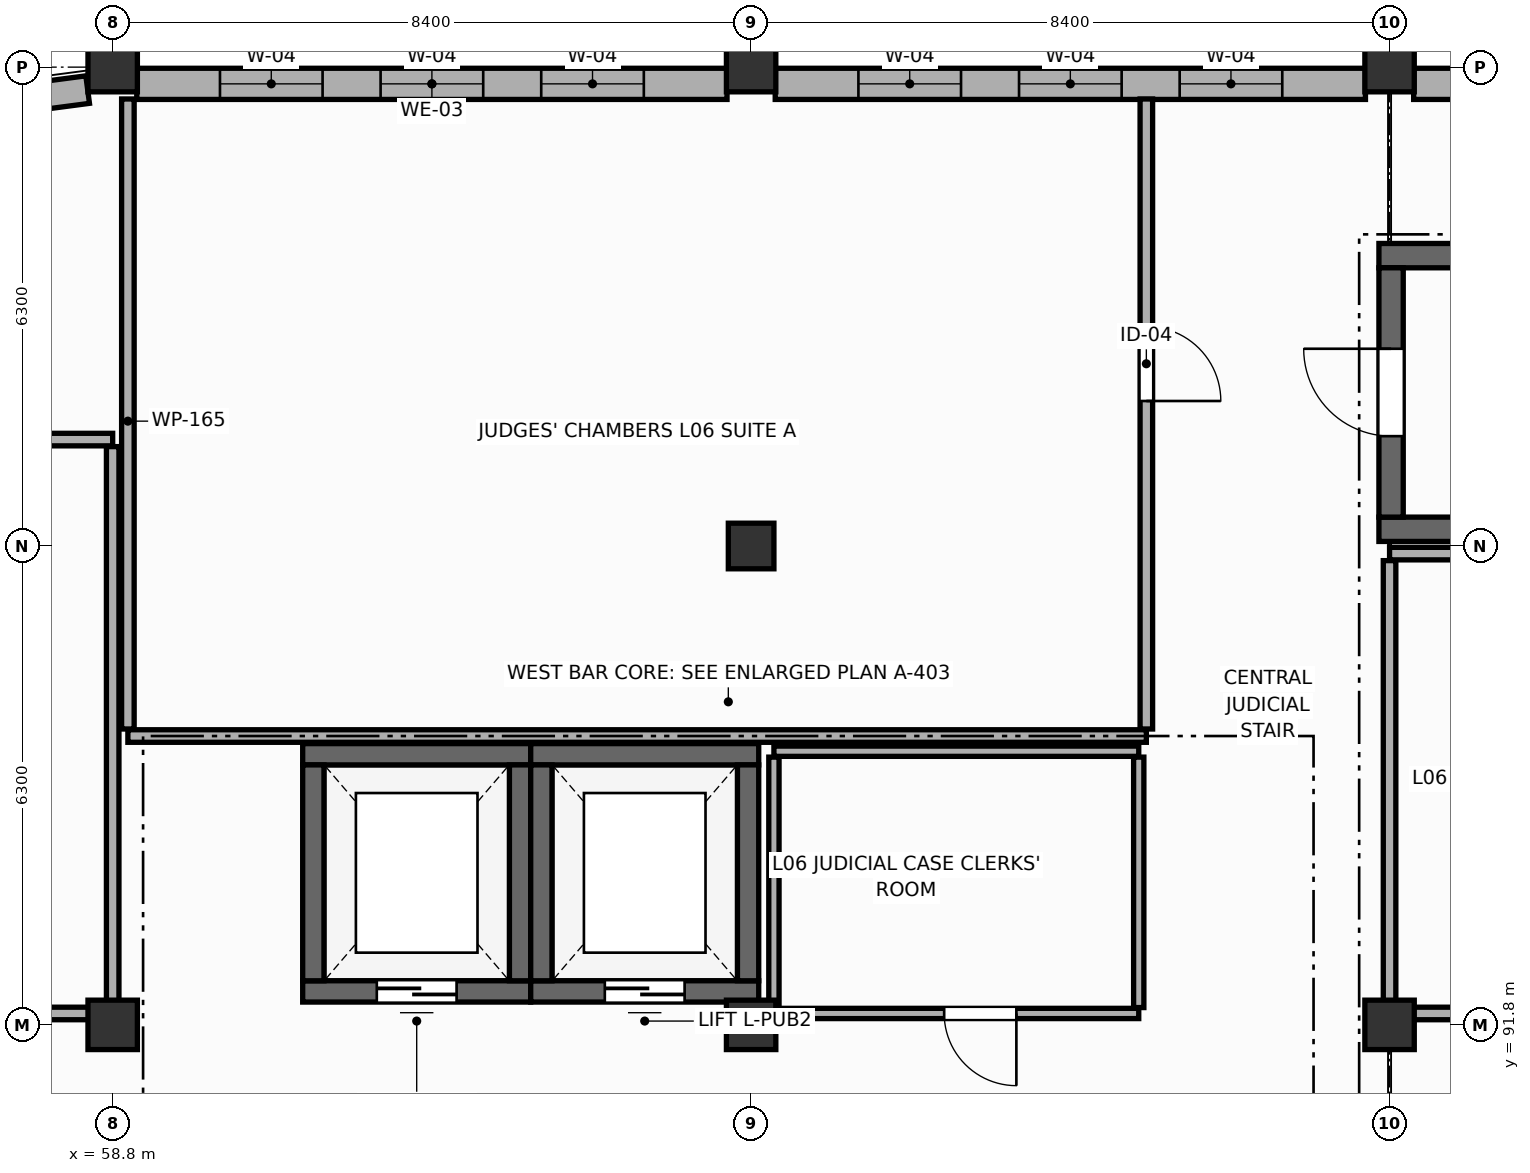
"""IFC4 building model, lengths in metres.
Left out: names, types, materials, properties, quantities, classifications, styles, units other than length and angle.
Written with IfcOpenShell. Run it as: python <this file> out.ifc"""

import sys

from ifc_helpers import new_model, si_unit, direction, frame, frame_2d, origin, origin_2d, place, context, subcontext, project, spatial, rectangle, extrude, element, fill, save


model = new_model("IFC4")
c1 = context("Model", 3, precision=1e-05, world=origin(), true_north=direction((0.0, 1.0)))
c2 = subcontext(c1, "Body", "Model", "MODEL_VIEW")
j1 = project(units=[si_unit("LENGTHUNIT", "METRE"), si_unit("PLANEANGLEUNIT", "RADIAN")], contexts=[c1])
p1 = place(None, origin())
s1 = spatial("IfcSite", under=j1, at=p1, CompositionType="ELEMENT")
p2 = place(p1, origin())
s2 = spatial("IfcBuilding", under=s1, at=p2, CompositionType="ELEMENT")
p3 = place(p2, frame((0.0, 0.0, 22.8)))
s3 = spatial("IfcBuildingStorey", under=s2, at=p3, CompositionType="ELEMENT", Elevation=22.8)
for number, where, z_axis, x_axis in (
    (1, (58.8, 91.8, 0.0), (0.0, 0.0, 1.0), (1.0, 0.0, 0.0)),
    (2, (58.8, 104.4, 0.0), (0.0, 0.0, 1.0), (1.0, 0.0, 0.0)),
    (3, (67.2, 91.8, 0.0), (0.0, 0.0, 1.0), (1.0, 0.0, 0.0)),
    (4, (67.2, 104.4, 0.0), (0.0, 0.0, 1.0), (1.0, 0.0, 0.0)),
):
    element("IfcColumn", number, at=place(p3, frame(where, z_axis=z_axis, x_axis=x_axis)), inside=s3, PredefinedType="COLUMN", context=c2, shape_type="SweptSolid", body=[
        extrude(rectangle(XDim=0.65, YDim=0.65, at=origin_2d()), origin(), (0.0, 0.0, 1.0), 4.2),
    ])
p4 = place(p3, frame((67.2, 98.1, 0.0), z_axis=(0.0, 0.0, 1.0), x_axis=(1.0, 0.0, 0.0)))
e5 = element("IfcColumn", 5, at=p4, inside=s3, PredefinedType="COLUMN", context=c2, shape_type="SweptSolid", body=[
    extrude(rectangle(XDim=0.6, YDim=0.6, at=origin_2d()), origin(), (0.0, 0.0, 1.0), 4.2),
])
for number, where, z_axis, x_axis in (
    (6, (75.6, 91.8, 0.0), (0.0, 0.0, 1.0), (1.0, 0.0, 0.0)),
    (7, (75.6, 104.4, 0.0), (0.0, 0.0, 1.0), (1.0, 0.0, 0.0)),
):
    element("IfcColumn", number, at=place(p3, frame(where, z_axis=z_axis, x_axis=x_axis)), inside=s3, PredefinedType="COLUMN", context=c2, shape_type="SweptSolid", body=[
        extrude(rectangle(XDim=0.65, YDim=0.65, at=origin_2d()), origin(), (0.0, 0.0, 1.0), 4.2),
    ])
p5 = place(p3, frame((59.117, 104.18, 0.0), z_axis=(0.0, 0.0, 1.0), x_axis=(1.0, 0.0, 0.0)))
e8 = element("IfcWall", 8, at=p5, inside=s3, PredefinedType="STANDARD", context=c2, shape_type="SweptSolid", body=[
    extrude(rectangle(XDim=7.766, YDim=0.41, at=frame_2d((3.883, 0.0))), origin(), (0.0, 0.0, 1.0), 3.1),
])
p6 = place(p5, frame((1.095, 0.0, 0.85)))
e9 = element("IfcOpeningElement", 9, at=p6, cuts=e8, PredefinedType="OPENING", context=c2, shape_type="SweptSolid", body=[
    extrude(rectangle(XDim=1.35, YDim=1.95, at=frame_2d((0.675, 0.975))), frame((0.0, 0.215, 0.0), z_axis=(0.0, -1.0, 0.0), x_axis=(1.0, 0.0, 0.0)), (0.0, 0.0, 1.0), 0.43),
])
p7 = place(p5, frame((3.208, 0.0, 0.85)))
e10 = element("IfcOpeningElement", 10, at=p7, cuts=e8, PredefinedType="OPENING", context=c2, shape_type="SweptSolid", body=[
    extrude(rectangle(XDim=1.35, YDim=1.95, at=frame_2d((0.675, 0.975))), frame((0.0, 0.215, 0.0), z_axis=(0.0, -1.0, 0.0), x_axis=(1.0, 0.0, 0.0)), (0.0, 0.0, 1.0), 0.43),
])
p8 = place(p5, frame((5.321, 0.0, 0.85)))
e11 = element("IfcOpeningElement", 11, at=p8, cuts=e8, PredefinedType="OPENING", context=c2, shape_type="SweptSolid", body=[
    extrude(rectangle(XDim=1.35, YDim=1.95, at=frame_2d((0.675, 0.975))), frame((0.0, 0.215, 0.0), z_axis=(0.0, -1.0, 0.0), x_axis=(1.0, 0.0, 0.0)), (0.0, 0.0, 1.0), 0.43),
])
p9 = place(p3, frame((67.517, 104.18, 0.0), z_axis=(0.0, 0.0, 1.0), x_axis=(1.0, 0.0, 0.0)))
e12 = element("IfcWall", 12, at=p9, inside=s3, PredefinedType="STANDARD", context=c2, shape_type="SweptSolid", body=[
    extrude(rectangle(XDim=7.766, YDim=0.41, at=frame_2d((3.883, 0.0))), origin(), (0.0, 0.0, 1.0), 3.1),
])
p10 = place(p9, frame((1.095, 0.0, 0.85)))
e13 = element("IfcOpeningElement", 13, at=p10, cuts=e12, PredefinedType="OPENING", context=c2, shape_type="SweptSolid", body=[
    extrude(rectangle(XDim=1.35, YDim=1.95, at=frame_2d((0.675, 0.975))), frame((0.0, 0.215, 0.0), z_axis=(0.0, -1.0, 0.0), x_axis=(1.0, 0.0, 0.0)), (0.0, 0.0, 1.0), 0.43),
])
p11 = place(p9, frame((3.208, 0.0, 0.85)))
e14 = element("IfcOpeningElement", 14, at=p11, cuts=e12, PredefinedType="OPENING", context=c2, shape_type="SweptSolid", body=[
    extrude(rectangle(XDim=1.35, YDim=1.95, at=frame_2d((0.675, 0.975))), frame((0.0, 0.215, 0.0), z_axis=(0.0, -1.0, 0.0), x_axis=(1.0, 0.0, 0.0)), (0.0, 0.0, 1.0), 0.43),
])
p12 = place(p9, frame((5.321, 0.0, 0.85)))
e15 = element("IfcOpeningElement", 15, at=p12, cuts=e12, PredefinedType="OPENING", context=c2, shape_type="SweptSolid", body=[
    extrude(rectangle(XDim=1.35, YDim=1.95, at=frame_2d((0.675, 0.975))), frame((0.0, 0.215, 0.0), z_axis=(0.0, -1.0, 0.0), x_axis=(1.0, 0.0, 0.0)), (0.0, 0.0, 1.0), 0.43),
])
p13 = place(p3, frame((75.917, 104.18, 0.0), z_axis=(0.0, 0.0, 1.0), x_axis=(1.0, 0.0, 0.0)))
e16 = element("IfcWall", 16, at=p13, inside=s3, PredefinedType="STANDARD", context=c2, shape_type="SweptSolid", body=[
    extrude(rectangle(XDim=7.766, YDim=0.41, at=frame_2d((3.883, 0.0))), origin(), (0.0, 0.0, 1.0), 3.1),
])
p14 = place(p3, frame((58.471, 104.104, 0.0), z_axis=(0.0, 0.0, 1.0), x_axis=(-0.99144889538, -0.13049554724, 0.0)))
e17 = element("IfcWall", 17, at=p14, inside=s3, PredefinedType="ELEMENTEDWALL", context=c2, shape_type="SweptSolid", body=[
    extrude(rectangle(XDim=2.924, YDim=0.365, at=frame_2d((1.462, 0.0))), origin(), (0.0, 0.0, 1.0), 3.1),
])
p15 = place(p14, frame((1.062, 0.0, 0.85)))
e18 = element("IfcOpeningElement", 18, at=p15, cuts=e17, PredefinedType="OPENING", context=c2, shape_type="SweptSolid", body=[
    extrude(rectangle(XDim=0.8, YDim=1.7, at=frame_2d((0.4, 0.85))), frame((0.0, 0.192, 0.0), z_axis=(0.0, -1.0, 0.0), x_axis=(1.0, 0.0, 0.0)), (0.0, 0.0, 1.0), 0.385),
])
for number, where, z_axis, x_axis in (
    (19, (75.46, 101.92, 0.0), (0.0, 0.0, 1.0), (1.0, 0.0, 0.0)),
    (20, (84.54, 98.32, 0.0), (0.0, 0.0, 1.0), (-1.0, 0.0, 0.0)),
):
    element("IfcWall", number, at=place(p3, frame(where, z_axis=z_axis, x_axis=x_axis)), inside=s3, PredefinedType="SHEAR", context=c2, shape_type="SweptSolid", body=[
        extrude(rectangle(XDim=9.08, YDim=0.32, at=frame_2d((4.54, 0.0))), origin(), (0.0, 0.0, 1.0), 3.97),
    ])
p16 = place(p3, frame((75.62, 98.48, 0.0), z_axis=(0.0, 0.0, 1.0), x_axis=(0.0, 1.0, 0.0)))
e21 = element("IfcWall", 21, at=p16, inside=s3, PredefinedType="SHEAR", context=c2, shape_type="SweptSolid", body=[
    extrude(rectangle(XDim=3.28, YDim=0.32, at=frame_2d((1.64, 0.0))), origin(), (0.0, 0.0, 1.0), 3.97),
])
p17 = place(p16, frame((1.065, 0.0, 0.0)))
e22 = element("IfcOpeningElement", 22, at=p17, cuts=e21, PredefinedType="OPENING", context=c2, shape_type="SweptSolid", body=[
    extrude(rectangle(XDim=1.15, YDim=2.2, at=frame_2d((0.575, 1.1))), frame((0.0, 0.17, 0.0), z_axis=(0.0, -1.0, 0.0), x_axis=(1.0, 0.0, 0.0)), (0.0, 0.0, 1.0), 0.34),
])
p18 = place(p3, frame((61.3, 95.36, 0.0), z_axis=(0.0, 0.0, 1.0), x_axis=(1.0, 0.0, 0.0)))
e23 = element("IfcWall", 23, at=p18, inside=s3, PredefinedType="SHEAR", context=c2, shape_type="SweptSolid", body=[
    extrude(rectangle(XDim=3.0, YDim=0.28, at=frame_2d((1.5, 0.0))), origin(), (0.0, 0.0, 1.0), 3.97),
])
p19 = place(p3, frame((64.3, 92.24, 0.0), z_axis=(0.0, 0.0, 1.0), x_axis=(-1.0, 0.0, 0.0)))
e24 = element("IfcWall", 24, at=p19, inside=s3, PredefinedType="SHEAR", context=c2, shape_type="SweptSolid", body=[
    extrude(rectangle(XDim=3.0, YDim=0.28, at=frame_2d((1.5, 0.0))), origin(), (0.0, 0.0, 1.0), 3.97),
])
p20 = place(p19, frame((0.975, 0.0, 0.0)))
e25 = element("IfcOpeningElement", 25, at=p20, cuts=e24, PredefinedType="OPENING", context=c2, shape_type="SweptSolid", body=[
    extrude(rectangle(XDim=1.05, YDim=2.2, at=frame_2d((0.525, 1.1))), frame((0.0, 0.15, 0.0), z_axis=(0.0, -1.0, 0.0), x_axis=(1.0, 0.0, 0.0)), (0.0, 0.0, 1.0), 0.3),
])
for number, where, z_axis, x_axis in (
    (26, (61.44, 92.38, 0.0), (0.0, 0.0, 1.0), (0.0, 1.0, 0.0)),
    (27, (64.16, 95.22, 0.0), (0.0, 0.0, 1.0), (0.0, -1.0, 0.0)),
):
    element("IfcWall", number, at=place(p3, frame(where, z_axis=z_axis, x_axis=x_axis)), inside=s3, PredefinedType="SHEAR", context=c2, shape_type="SweptSolid", body=[
        extrude(rectangle(XDim=2.84, YDim=0.28, at=frame_2d((1.42, 0.0))), origin(), (0.0, 0.0, 1.0), 3.97),
    ])
p21 = place(p3, frame((64.3, 95.36, 0.0), z_axis=(0.0, 0.0, 1.0), x_axis=(1.0, 0.0, 0.0)))
e28 = element("IfcWall", 28, at=p21, inside=s3, PredefinedType="SHEAR", context=c2, shape_type="SweptSolid", body=[
    extrude(rectangle(XDim=3.0, YDim=0.28, at=frame_2d((1.5, 0.0))), origin(), (0.0, 0.0, 1.0), 3.97),
])
p22 = place(p3, frame((67.3, 92.24, 0.0), z_axis=(0.0, 0.0, 1.0), x_axis=(-1.0, 0.0, 0.0)))
e29 = element("IfcWall", 29, at=p22, inside=s3, PredefinedType="SHEAR", context=c2, shape_type="SweptSolid", body=[
    extrude(rectangle(XDim=3.0, YDim=0.28, at=frame_2d((1.5, 0.0))), origin(), (0.0, 0.0, 1.0), 3.97),
])
p23 = place(p22, frame((0.975, 0.0, 0.0)))
e30 = element("IfcOpeningElement", 30, at=p23, cuts=e29, PredefinedType="OPENING", context=c2, shape_type="SweptSolid", body=[
    extrude(rectangle(XDim=1.05, YDim=2.2, at=frame_2d((0.525, 1.1))), frame((0.0, 0.15, 0.0), z_axis=(0.0, -1.0, 0.0), x_axis=(1.0, 0.0, 0.0)), (0.0, 0.0, 1.0), 0.3),
])
for number, where, z_axis, x_axis in (
    (31, (64.44, 92.38, 0.0), (0.0, 0.0, 1.0), (0.0, 1.0, 0.0)),
    (32, (67.16, 95.22, 0.0), (0.0, 0.0, 1.0), (0.0, -1.0, 0.0)),
):
    element("IfcWall", number, at=place(p3, frame(where, z_axis=z_axis, x_axis=x_axis)), inside=s3, PredefinedType="SHEAR", context=c2, shape_type="SweptSolid", body=[
        extrude(rectangle(XDim=2.84, YDim=0.28, at=frame_2d((1.42, 0.0))), origin(), (0.0, 0.0, 1.0), 3.97),
    ])
p24 = place(p3, frame((72.4, 95.6, 0.0), z_axis=(0.0, 0.0, 1.0), x_axis=(-1.0, 0.0, 0.0)))
e33 = element("IfcWall", 33, at=p24, inside=s3, PredefinedType="PARTITIONING", context=c2, shape_type="SweptSolid", body=[
    extrude(rectangle(XDim=13.4, YDim=0.165, at=frame_2d((6.7, 0.0))), origin(), (0.0, 0.0, 1.0), 3.1),
])
p25 = place(p3, frame((59.0, 95.692, 0.0), z_axis=(0.0, 0.0, 1.0), x_axis=(0.0, 1.0, 0.0)))
e34 = element("IfcWall", 34, at=p25, inside=s3, PredefinedType="PARTITIONING", context=c2, shape_type="SweptSolid", body=[
    extrude(rectangle(XDim=8.289, YDim=0.165, at=frame_2d((4.144, 0.0))), origin(), (0.0, 0.0, 1.0), 3.1),
])
p26 = place(p3, frame((72.4, 103.981, 0.0), z_axis=(0.0, 0.0, 1.0), x_axis=(0.0, -1.0, 0.0)))
e35 = element("IfcWall", 35, at=p26, inside=s3, PredefinedType="PARTITIONING", context=c2, shape_type="SweptSolid", body=[
    extrude(rectangle(XDim=8.289, YDim=0.165, at=frame_2d((4.144, 0.0))), origin(), (0.0, 0.0, 1.0), 3.955),
])
p27 = place(p26, frame((2.993, 0.0, 0.0)))
e36 = element("IfcOpeningElement", 36, at=p27, cuts=e35, PredefinedType="OPENING", context=c2, shape_type="SweptSolid", body=[
    extrude(rectangle(XDim=0.98, YDim=2.2, at=frame_2d((0.49, 1.1))), frame((0.0, 0.093, 0.0), z_axis=(0.0, -1.0, 0.0), x_axis=(1.0, 0.0, 0.0)), (0.0, 0.0, 1.0), 0.185),
])
p28 = place(p3, frame((67.5, 95.4, 0.0), z_axis=(0.0, 0.0, 1.0), x_axis=(1.0, 0.0, 0.0)))
e37 = element("IfcWall", 37, at=p28, inside=s3, PredefinedType="PARTITIONING", context=c2, shape_type="SweptSolid", body=[
    extrude(rectangle(XDim=4.8, YDim=0.135, at=frame_2d((2.4, 0.0))), origin(), (0.0, 0.0, 1.0), 3.5),
])
p29 = place(p3, frame((72.3, 91.95, 0.0), z_axis=(0.0, 0.0, 1.0), x_axis=(-1.0, 0.0, 0.0)))
e38 = element("IfcWall", 38, at=p29, inside=s3, PredefinedType="PARTITIONING", context=c2, shape_type="SweptSolid", body=[
    extrude(rectangle(XDim=4.8, YDim=0.135, at=frame_2d((2.4, 0.0))), origin(), (0.0, 0.0, 1.0), 3.4),
])
p30 = place(p29, frame((1.61, 0.0, 0.0)))
e39 = element("IfcOpeningElement", 39, at=p30, cuts=e38, PredefinedType="OPENING", context=c2, shape_type="SweptSolid", body=[
    extrude(rectangle(XDim=0.95, YDim=2.15, at=frame_2d((0.475, 1.075))), frame((0.0, 0.077, 0.0), z_axis=(0.0, -1.0, 0.0), x_axis=(1.0, 0.0, 0.0)), (0.0, 0.0, 1.0), 0.155),
])
for number, where, z_axis, x_axis in (
    (40, (67.5, 92.028, 0.0), (0.0, 0.0, 1.0), (0.0, 1.0, 0.0)),
    (41, (72.3, 95.323, 0.0), (0.0, 0.0, 1.0), (0.0, -1.0, 0.0)),
):
    element("IfcWall", number, at=place(p3, frame(where, z_axis=z_axis, x_axis=x_axis)), inside=s3, PredefinedType="PARTITIONING", context=c2, shape_type="SweptSolid", body=[
        extrude(rectangle(XDim=3.295, YDim=0.135, at=frame_2d((1.647, 0.0))), origin(), (0.0, 0.0, 1.0), 3.4),
    ])
p31 = place(p3, frame((75.6, 98.0, 0.0), z_axis=(0.0, 0.0, 1.0), x_axis=(1.0, 0.0, 0.0)))
e42 = element("IfcWall", 42, at=p31, inside=s3, PredefinedType="PARTITIONING", context=c2, shape_type="SweptSolid", body=[
    extrude(rectangle(XDim=8.8, YDim=0.165, at=frame_2d((4.4, 0.0))), origin(), (0.0, 0.0, 1.0), 3.1),
])
p32 = place(p3, frame((84.4, 91.95, 0.0), z_axis=(0.0, 0.0, 1.0), x_axis=(-1.0, 0.0, 0.0)))
e43 = element("IfcWall", 43, at=p32, inside=s3, PredefinedType="PARTITIONING", context=c2, shape_type="SweptSolid", body=[
    extrude(rectangle(XDim=8.8, YDim=0.165, at=frame_2d((4.4, 0.0))), origin(), (0.0, 0.0, 1.0), 3.1),
])
p33 = place(p32, frame((3.545, 0.0, 0.0)))
e44 = element("IfcOpeningElement", 44, at=p33, cuts=e43, PredefinedType="OPENING", context=c2, shape_type="SweptSolid", body=[
    extrude(rectangle(XDim=1.0, YDim=2.15, at=frame_2d((0.5, 1.075))), frame((0.0, 0.093, 0.0), z_axis=(0.0, -1.0, 0.0), x_axis=(1.0, 0.0, 0.0)), (0.0, 0.0, 1.0), 0.185),
])
p34 = place(p3, frame((75.6, 92.042, 0.0), z_axis=(0.0, 0.0, 1.0), x_axis=(0.0, 1.0, 0.0)))
e45 = element("IfcWall", 45, at=p34, inside=s3, PredefinedType="PARTITIONING", context=c2, shape_type="SweptSolid", body=[
    extrude(rectangle(XDim=5.865, YDim=0.165, at=frame_2d((2.933, 0.0))), origin(), (0.0, 0.0, 1.0), 3.1),
])
p35 = place(p3, frame((49.3, 99.5, 0.0), z_axis=(0.0, 0.0, 1.0), x_axis=(1.0, 0.0, 0.0)))
e46 = element("IfcWall", 46, at=p35, inside=s3, PredefinedType="PARTITIONING", context=c2, shape_type="SweptSolid", body=[
    extrude(rectangle(XDim=9.5, YDim=0.165, at=frame_2d((4.75, 0.0))), origin(), (0.0, 0.0, 1.0), 3.0),
])
p36 = place(p3, frame((58.8, 91.95, 0.0), z_axis=(0.0, 0.0, 1.0), x_axis=(-1.0, 0.0, 0.0)))
e47 = element("IfcWall", 47, at=p36, inside=s3, PredefinedType="PARTITIONING", context=c2, shape_type="SweptSolid", body=[
    extrude(rectangle(XDim=9.5, YDim=0.165, at=frame_2d((4.75, 0.0))), origin(), (0.0, 0.0, 1.0), 3.0),
])
p37 = place(p36, frame((3.087, 0.0, 0.0)))
e48 = element("IfcOpeningElement", 48, at=p37, cuts=e47, PredefinedType="OPENING", context=c2, shape_type="SweptSolid", body=[
    extrude(rectangle(XDim=0.98, YDim=2.2, at=frame_2d((0.49, 1.1))), frame((0.0, 0.093, 0.0), z_axis=(0.0, -1.0, 0.0), x_axis=(1.0, 0.0, 0.0)), (0.0, 0.0, 1.0), 0.185),
])
p38 = place(p3, frame((58.8, 99.407, 0.0), z_axis=(0.0, 0.0, 1.0), x_axis=(0.0, -1.0, 0.0)))
e49 = element("IfcWall", 49, at=p38, inside=s3, PredefinedType="PARTITIONING", context=c2, shape_type="SweptSolid", body=[
    extrude(rectangle(XDim=7.365, YDim=0.165, at=frame_2d((3.683, 0.0))), origin(), (0.0, 0.0, 1.0), 3.1),
])
p39 = place(p6, origin())
e50 = element("IfcWindow", 50, at=p39, inside=s3, PartitioningType="SINGLE_PANEL", PredefinedType="WINDOW", context=c2, shape_type="SweptSolid", body=[
    extrude(rectangle(XDim=1.35, YDim=1.95, at=frame_2d((0.675, 0.975))), frame((0.0, 0.03, 0.0), z_axis=(0.0, -1.0, 0.0), x_axis=(1.0, 0.0, 0.0)), (0.0, 0.0, 1.0), 0.06),
])
fill(e9, e50)
p40 = place(p7, origin())
e51 = element("IfcWindow", 51, at=p40, inside=s3, PartitioningType="SINGLE_PANEL", PredefinedType="WINDOW", context=c2, shape_type="SweptSolid", body=[
    extrude(rectangle(XDim=1.35, YDim=1.95, at=frame_2d((0.675, 0.975))), frame((0.0, 0.03, 0.0), z_axis=(0.0, -1.0, 0.0), x_axis=(1.0, 0.0, 0.0)), (0.0, 0.0, 1.0), 0.06),
])
fill(e10, e51)
p41 = place(p8, origin())
e52 = element("IfcWindow", 52, at=p41, inside=s3, PartitioningType="SINGLE_PANEL", PredefinedType="WINDOW", context=c2, shape_type="SweptSolid", body=[
    extrude(rectangle(XDim=1.35, YDim=1.95, at=frame_2d((0.675, 0.975))), frame((0.0, 0.03, 0.0), z_axis=(0.0, -1.0, 0.0), x_axis=(1.0, 0.0, 0.0)), (0.0, 0.0, 1.0), 0.06),
])
fill(e11, e52)
p42 = place(p10, origin())
e53 = element("IfcWindow", 53, at=p42, inside=s3, PartitioningType="SINGLE_PANEL", PredefinedType="WINDOW", context=c2, shape_type="SweptSolid", body=[
    extrude(rectangle(XDim=1.35, YDim=1.95, at=frame_2d((0.675, 0.975))), frame((0.0, 0.03, 0.0), z_axis=(0.0, -1.0, 0.0), x_axis=(1.0, 0.0, 0.0)), (0.0, 0.0, 1.0), 0.06),
])
fill(e13, e53)
p43 = place(p11, origin())
e54 = element("IfcWindow", 54, at=p43, inside=s3, PartitioningType="SINGLE_PANEL", PredefinedType="WINDOW", context=c2, shape_type="SweptSolid", body=[
    extrude(rectangle(XDim=1.35, YDim=1.95, at=frame_2d((0.675, 0.975))), frame((0.0, 0.03, 0.0), z_axis=(0.0, -1.0, 0.0), x_axis=(1.0, 0.0, 0.0)), (0.0, 0.0, 1.0), 0.06),
])
fill(e14, e54)
p44 = place(p12, origin())
e55 = element("IfcWindow", 55, at=p44, inside=s3, PartitioningType="SINGLE_PANEL", PredefinedType="WINDOW", context=c2, shape_type="SweptSolid", body=[
    extrude(rectangle(XDim=1.35, YDim=1.95, at=frame_2d((0.675, 0.975))), frame((0.0, 0.03, 0.0), z_axis=(0.0, -1.0, 0.0), x_axis=(1.0, 0.0, 0.0)), (0.0, 0.0, 1.0), 0.06),
])
fill(e15, e55)
p45 = place(p17, origin())
e56 = element("IfcDoor", 56, at=p45, inside=s3, OperationType="SINGLE_SWING_RIGHT", PredefinedType="DOOR", context=c2, shape_type="SweptSolid", body=[
    extrude(rectangle(XDim=1.15, YDim=2.2, at=frame_2d((0.575, 1.1))), frame((0.0, 0.025, 0.0), z_axis=(0.0, -1.0, 0.0), x_axis=(1.0, 0.0, 0.0)), (0.0, 0.0, 1.0), 0.05),
])
fill(e22, e56)
p46 = place(p20, origin())
e57 = element("IfcDoor", 57, at=p46, inside=s3, OperationType="DOUBLE_DOOR_SLIDING", PredefinedType="DOOR", context=c2, shape_type="SweptSolid", body=[
    extrude(rectangle(XDim=1.05, YDim=2.2, at=frame_2d((0.525, 1.1))), frame((0.0, 0.025, 0.0), z_axis=(0.0, -1.0, 0.0), x_axis=(1.0, 0.0, 0.0)), (0.0, 0.0, 1.0), 0.05),
])
fill(e25, e57)
p47 = place(p23, origin())
e58 = element("IfcDoor", 58, at=p47, inside=s3, OperationType="DOUBLE_DOOR_SLIDING", PredefinedType="DOOR", context=c2, shape_type="SweptSolid", body=[
    extrude(rectangle(XDim=1.05, YDim=2.2, at=frame_2d((0.525, 1.1))), frame((0.0, 0.025, 0.0), z_axis=(0.0, -1.0, 0.0), x_axis=(1.0, 0.0, 0.0)), (0.0, 0.0, 1.0), 0.05),
])
fill(e30, e58)
p48 = place(p27, origin())
e59 = element("IfcDoor", 59, at=p48, inside=s3, OperationType="SINGLE_SWING_RIGHT", PredefinedType="DOOR", context=c2, shape_type="SweptSolid", body=[
    extrude(rectangle(XDim=0.98, YDim=2.2, at=frame_2d((0.49, 1.1))), frame((0.0, 0.025, 0.0), z_axis=(0.0, -1.0, 0.0), x_axis=(1.0, 0.0, 0.0)), (0.0, 0.0, 1.0), 0.05),
])
fill(e36, e59)
p49 = place(p30, origin())
e60 = element("IfcDoor", 60, at=p49, inside=s3, OperationType="SINGLE_SWING_LEFT", PredefinedType="DOOR", context=c2, shape_type="SweptSolid", body=[
    extrude(rectangle(XDim=0.95, YDim=2.15, at=frame_2d((0.475, 1.075))), frame((0.0, 0.025, 0.0), z_axis=(0.0, -1.0, 0.0), x_axis=(1.0, 0.0, 0.0)), (0.0, 0.0, 1.0), 0.05),
])
fill(e39, e60)
save(model, sys.argv[1])
